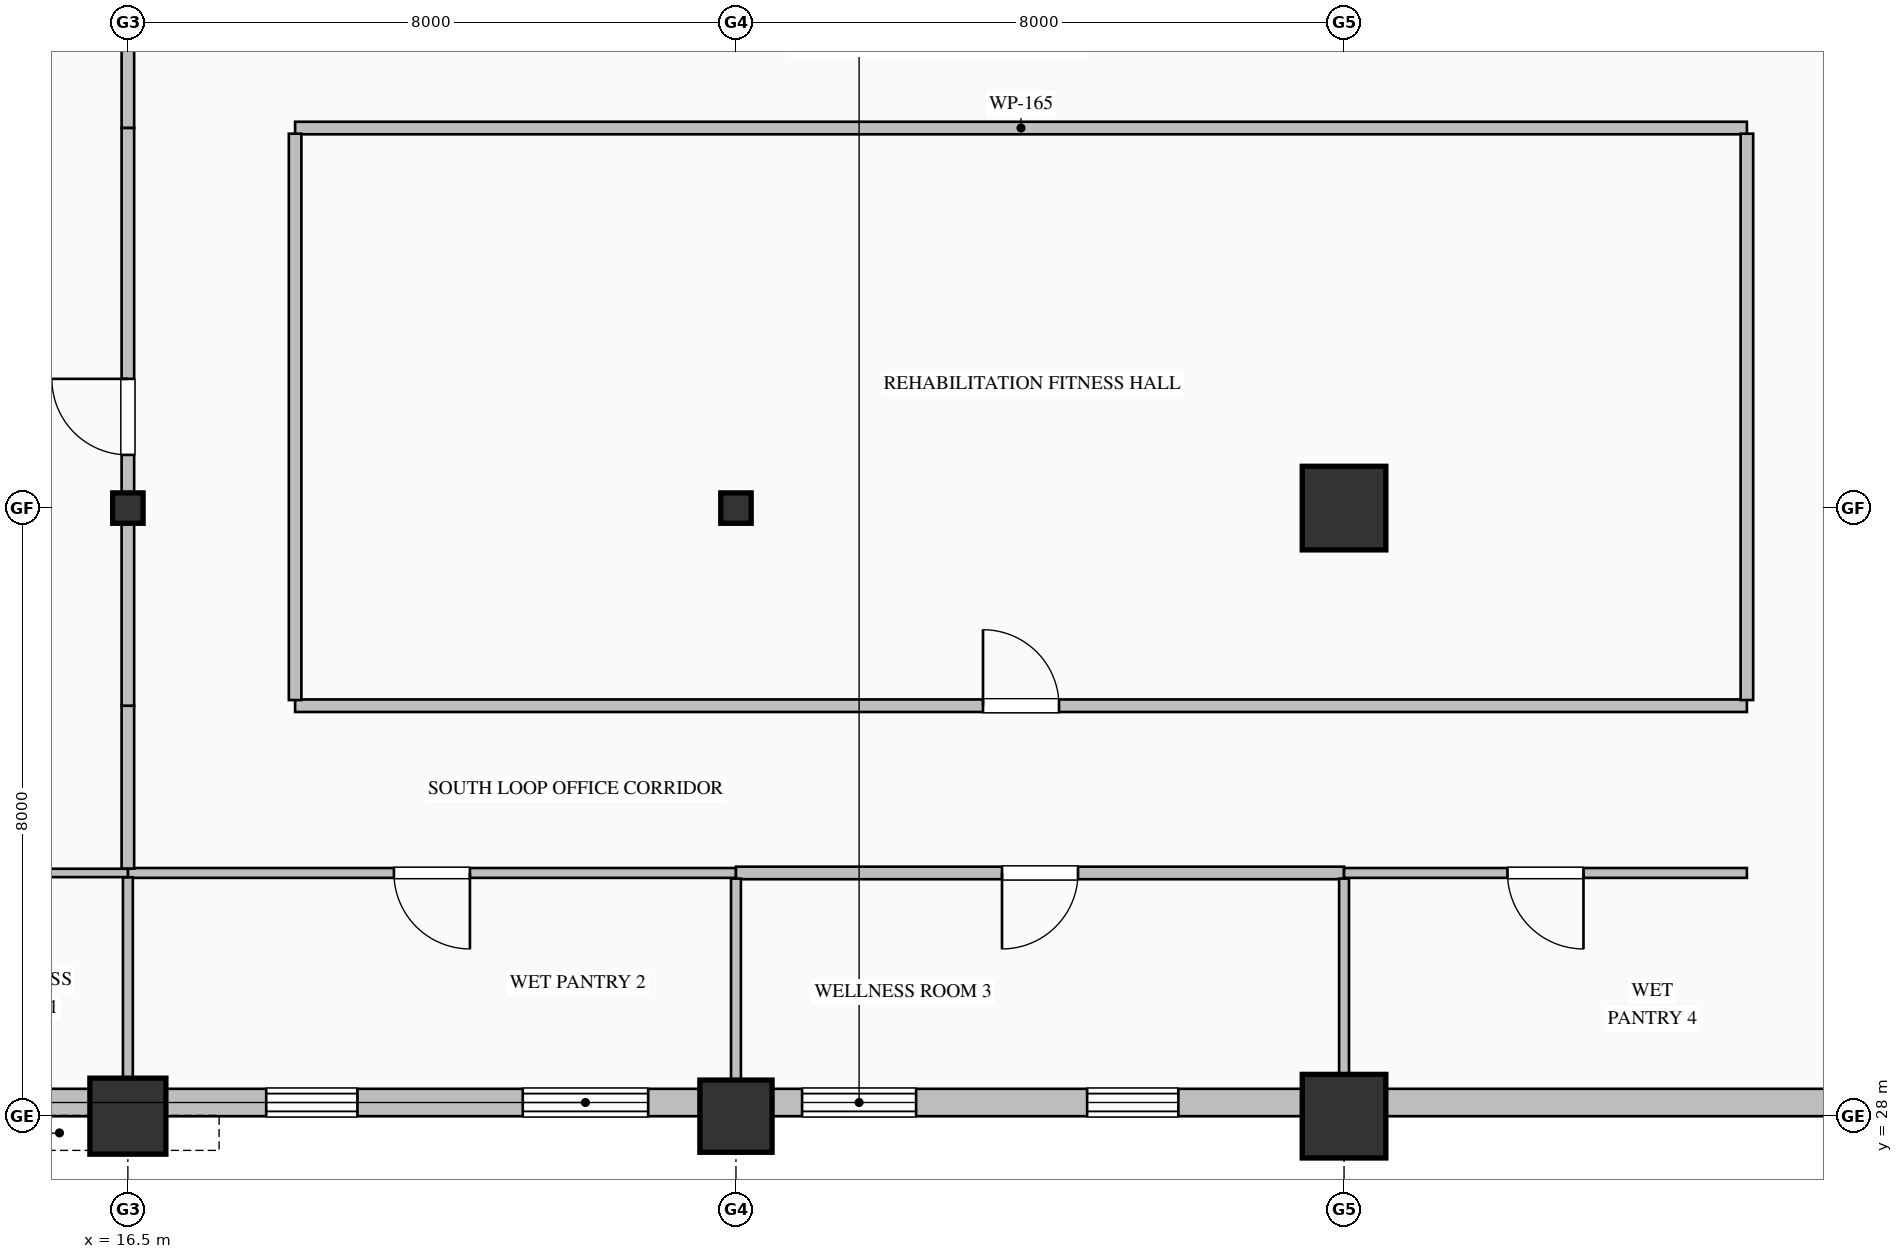
"""IFC4 building model, lengths in metres.
Left out: names, types, materials, properties, quantities, classifications, styles, units other than length and angle.
Written with IfcOpenShell. Run it as: python <this file> out.ifc"""

import sys

from ifc_helpers import new_model, si_unit, direction, frame, frame_2d, origin, origin_2d, place, context, subcontext, project, spatial, rectangle, hollow_rectangle, hollow_circle, i_section, extrude, element, fill, save


model = new_model("IFC4")
c1 = context("Model", 3, precision=1e-05, world=origin(), true_north=direction((0.0, 1.0)))
c2 = subcontext(c1, "Body", "Model", "MODEL_VIEW")
j1 = project(units=[si_unit("LENGTHUNIT", "METRE"), si_unit("PLANEANGLEUNIT", "RADIAN")], contexts=[c1])
p1 = place(None, origin())
s1 = spatial("IfcSite", under=j1, at=p1, CompositionType="ELEMENT")
p2 = place(p1, origin())
s2 = spatial("IfcBuilding", under=s1, at=p2, CompositionType="ELEMENT")
p3 = place(p2, frame((0.0, 0.0, 171.0)))
s3 = spatial("IfcBuildingStorey", under=s2, at=p3, CompositionType="ELEMENT", Elevation=171.0)
p4 = place(p3, frame((16.5, 28.0, 0.0), z_axis=(0.0, 0.0, 1.0), x_axis=(1.0, 0.0, 0.0)))
e1 = element("IfcColumn", 1, at=p4, inside=s3, PredefinedType="COLUMN", context=c2, shape_type="SweptSolid", body=[
    extrude(hollow_circle(Radius=0.5, WallThickness=0.036, at=origin_2d()), origin(), (0.0, 0.0, 1.0), 4.0),
])
p5 = place(p3, frame((16.5, 36.0, 0.0), z_axis=(0.0, 0.0, 1.0), x_axis=(1.0, 0.0, 0.0)))
e2 = element("IfcColumn", 2, at=p5, inside=s3, PredefinedType="COLUMN", context=c2, shape_type="SweptSolid", body=[
    extrude(i_section(OverallWidth=0.4, OverallDepth=0.4, WebThickness=0.013, FlangeThickness=0.021, FilletRadius=0.022, at=origin_2d()), origin(), (0.0, 0.0, 1.0), 4.0),
])
p6 = place(p3, frame((24.5, 28.0, 0.0), z_axis=(0.0, 0.0, 1.0), x_axis=(1.0, 0.0, 0.0)))
e3 = element("IfcColumn", 3, at=p6, inside=s3, PredefinedType="COLUMN", context=c2, shape_type="SweptSolid", body=[
    extrude(hollow_rectangle(XDim=0.95, YDim=0.95, WallThickness=0.036, at=origin_2d()), origin(), (0.0, 0.0, 1.0), 4.0),
])
p7 = place(p3, frame((24.5, 36.0, 0.0), z_axis=(0.0, 0.0, 1.0), x_axis=(1.0, 0.0, 0.0)))
e4 = element("IfcColumn", 4, at=p7, inside=s3, PredefinedType="COLUMN", context=c2, shape_type="SweptSolid", body=[
    extrude(i_section(OverallWidth=0.4, OverallDepth=0.4, WebThickness=0.013, FlangeThickness=0.021, FilletRadius=0.022, at=origin_2d()), origin(), (0.0, 0.0, 1.0), 4.0),
])
for number, where, z_axis, x_axis in (
    (5, (32.5, 28.0, 0.0), (0.0, 0.0, 1.0), (1.0, 0.0, 0.0)),
    (6, (32.5, 36.0, 0.0), (0.0, 0.0, 1.0), (1.0, 0.0, 0.0)),
):
    element("IfcColumn", number, at=place(p3, frame(where, z_axis=z_axis, x_axis=x_axis)), inside=s3, PredefinedType="COLUMN", context=c2, shape_type="SweptSolid", body=[
        extrude(hollow_rectangle(XDim=1.1, YDim=1.1, WallThickness=0.04, at=origin_2d()), origin(), (0.0, 0.0, 1.0), 4.0),
    ])
p8 = place(p3, frame((40.52, 28.18, 0.0), z_axis=(0.0, 0.0, 1.0), x_axis=(-1.0, 0.0, 0.0)))
e7 = element("IfcWall", 7, at=p8, inside=s3, PredefinedType="SOLIDWALL", context=c2, shape_type="SweptSolid", body=[
    extrude(rectangle(XDim=27.52, YDim=0.36, at=frame_2d((13.76, 0.0))), origin(), (0.0, 0.0, 1.0), 3.165),
])
p9 = place(p8, frame((10.2, 0.0, 0.7)))
e8 = element("IfcOpeningElement", 8, at=p9, cuts=e7, PredefinedType="OPENING", context=c2, shape_type="SweptSolid", body=[
    extrude(rectangle(XDim=1.2, YDim=1.85, at=frame_2d((0.6, 0.925))), frame((0.0, 0.19, 0.0), z_axis=(0.0, -1.0, 0.0), x_axis=(1.0, 0.0, 0.0)), (0.0, 0.0, 1.0), 0.38),
])
p10 = place(p8, frame((13.65, 0.0, 0.85)))
e9 = element("IfcOpeningElement", 9, at=p10, cuts=e7, PredefinedType="OPENING", context=c2, shape_type="SweptSolid", body=[
    extrude(rectangle(XDim=1.5, YDim=1.95, at=frame_2d((0.75, 0.975))), frame((0.0, 0.19, 0.0), z_axis=(0.0, -1.0, 0.0), x_axis=(1.0, 0.0, 0.0)), (0.0, 0.0, 1.0), 0.38),
])
p11 = place(p8, frame((17.175, 0.0, 0.85)))
e10 = element("IfcOpeningElement", 10, at=p11, cuts=e7, PredefinedType="OPENING", context=c2, shape_type="SweptSolid", body=[
    extrude(rectangle(XDim=1.65, YDim=1.95, at=frame_2d((0.825, 0.975))), frame((0.0, 0.19, 0.0), z_axis=(0.0, -1.0, 0.0), x_axis=(1.0, 0.0, 0.0)), (0.0, 0.0, 1.0), 0.38),
])
p12 = place(p8, frame((21.0, 0.0, 0.7)))
e11 = element("IfcOpeningElement", 11, at=p12, cuts=e7, PredefinedType="OPENING", context=c2, shape_type="SweptSolid", body=[
    extrude(rectangle(XDim=1.2, YDim=1.85, at=frame_2d((0.6, 0.925))), frame((0.0, 0.19, 0.0), z_axis=(0.0, -1.0, 0.0), x_axis=(1.0, 0.0, 0.0)), (0.0, 0.0, 1.0), 0.38),
])
p13 = place(p3, frame((18.7, 33.4, 0.0), z_axis=(0.0, 0.0, 1.0), x_axis=(1.0, 0.0, 0.0)))
e12 = element("IfcWall", 12, at=p13, inside=s3, PredefinedType="PARTITIONING", context=c2, shape_type="SweptSolid", body=[
    extrude(rectangle(XDim=19.1, YDim=0.165, at=frame_2d((9.55, 0.0))), origin(), (0.0, 0.0, 1.0), 3.765),
])
p14 = place(p13, frame((9.05, 0.0, 0.0)))
e13 = element("IfcOpeningElement", 13, at=p14, cuts=e12, PredefinedType="OPENING", context=c2, shape_type="SweptSolid", body=[
    extrude(rectangle(XDim=1.0, YDim=2.15, at=frame_2d((0.5, 1.075))), frame((0.0, 0.093, 0.0), z_axis=(0.0, -1.0, 0.0), x_axis=(1.0, 0.0, 0.0)), (0.0, 0.0, 1.0), 0.185),
])
p15 = place(p3, frame((24.5, 31.2, 0.0), z_axis=(0.0, 0.0, 1.0), x_axis=(-1.0, 0.0, 0.0)))
e14 = element("IfcWall", 14, at=p15, inside=s3, PredefinedType="PARTITIONING", context=c2, shape_type="SweptSolid", body=[
    extrude(rectangle(XDim=8.0, YDim=0.13, at=frame_2d((4.0, 0.0))), origin(), (0.0, 0.0, 1.0), 3.765),
])
p16 = place(p15, frame((3.5, 0.0, 0.0)))
e15 = element("IfcOpeningElement", 15, at=p16, cuts=e14, PredefinedType="OPENING", context=c2, shape_type="SweptSolid", body=[
    extrude(rectangle(XDim=1.0, YDim=2.15, at=frame_2d((0.5, 1.075))), frame((0.0, 0.075, 0.0), z_axis=(0.0, -1.0, 0.0), x_axis=(1.0, 0.0, 0.0)), (0.0, 0.0, 1.0), 0.15),
])
p17 = place(p3, frame((32.5, 31.2, 0.0), z_axis=(0.0, 0.0, 1.0), x_axis=(-1.0, 0.0, 0.0)))
e16 = element("IfcWall", 16, at=p17, inside=s3, PredefinedType="PARTITIONING", context=c2, shape_type="SweptSolid", body=[
    extrude(rectangle(XDim=8.0, YDim=0.165, at=frame_2d((4.0, 0.0))), origin(), (0.0, 0.0, 1.0), 3.765),
])
p18 = place(p17, frame((3.5, 0.0, 0.0)))
e17 = element("IfcOpeningElement", 17, at=p18, cuts=e16, PredefinedType="OPENING", context=c2, shape_type="SweptSolid", body=[
    extrude(rectangle(XDim=1.0, YDim=2.15, at=frame_2d((0.5, 1.075))), frame((0.0, 0.093, 0.0), z_axis=(0.0, -1.0, 0.0), x_axis=(1.0, 0.0, 0.0)), (0.0, 0.0, 1.0), 0.185),
])
p19 = place(p3, frame((37.8, 31.2, 0.0), z_axis=(0.0, 0.0, 1.0), x_axis=(-1.0, 0.0, 0.0)))
e18 = element("IfcWall", 18, at=p19, inside=s3, PredefinedType="PARTITIONING", context=c2, shape_type="SweptSolid", body=[
    extrude(rectangle(XDim=5.3, YDim=0.13, at=frame_2d((2.65, 0.0))), origin(), (0.0, 0.0, 1.0), 3.765),
])
p20 = place(p19, frame((2.15, 0.0, 0.0)))
e19 = element("IfcOpeningElement", 19, at=p20, cuts=e18, PredefinedType="OPENING", context=c2, shape_type="SweptSolid", body=[
    extrude(rectangle(XDim=1.0, YDim=2.15, at=frame_2d((0.5, 1.075))), frame((0.0, 0.075, 0.0), z_axis=(0.0, -1.0, 0.0), x_axis=(1.0, 0.0, 0.0)), (0.0, 0.0, 1.0), 0.15),
])
p21 = place(p3, frame((16.5, 31.257, 0.0), z_axis=(0.0, 0.0, 1.0), x_axis=(0.0, 1.0, 0.0)))
e20 = element("IfcWall", 20, at=p21, inside=s3, PredefinedType="PARTITIONING", context=c2, shape_type="SweptSolid", body=[
    extrude(rectangle(XDim=2.143, YDim=0.165, at=frame_2d((1.071, 0.0))), origin(), (0.0, 0.0, 1.0), 3.157),
])
p22 = place(p3, frame((37.8, 41.0, 0.0), z_axis=(0.0, 0.0, 1.0), x_axis=(-1.0, 0.0, 0.0)))
e21 = element("IfcWall", 21, at=p22, inside=s3, PredefinedType="PARTITIONING", context=c2, shape_type="SweptSolid", body=[
    extrude(rectangle(XDim=19.1, YDim=0.165, at=frame_2d((9.55, 0.0))), origin(), (0.0, 0.0, 1.0), 3.765),
])
p23 = place(p3, frame((16.5, 41.0, 0.0), z_axis=(0.0, 0.0, 1.0), x_axis=(0.0, 1.0, 0.0)))
e22 = element("IfcWall", 22, at=p23, inside=s3, PredefinedType="PARTITIONING", context=c2, shape_type="SweptSolid", body=[
    extrude(rectangle(XDim=2.125, YDim=0.165, at=frame_2d((1.063, 0.0))), origin(), (0.0, 0.0, 1.0), 3.157),
])
p24 = place(p3, frame((18.7, 40.926, 0.0), z_axis=(0.0, 0.0, 1.0), x_axis=(0.0, -1.0, 0.0)))
e23 = element("IfcWall", 23, at=p24, inside=s3, PredefinedType="PARTITIONING", context=c2, shape_type="SweptSolid", body=[
    extrude(rectangle(XDim=7.451, YDim=0.165, at=frame_2d((3.726, 0.0))), origin(), (0.0, 0.0, 1.0), 3.765),
])
p25 = place(p3, frame((16.5, 33.4, 0.0), z_axis=(0.0, 0.0, 1.0), x_axis=(0.0, 1.0, 0.0)))
e24 = element("IfcWall", 24, at=p25, inside=s3, PredefinedType="PARTITIONING", context=c2, shape_type="SweptSolid", body=[
    extrude(rectangle(XDim=7.6, YDim=0.165, at=frame_2d((3.8, 0.0))), origin(), (0.0, 0.0, 1.0), 3.157),
])
p26 = place(p25, frame((3.3, 0.0, 0.0)))
e25 = element("IfcOpeningElement", 25, at=p26, cuts=e24, PredefinedType="OPENING", context=c2, shape_type="SweptSolid", body=[
    extrude(rectangle(XDim=1.0, YDim=2.15, at=frame_2d((0.5, 1.075))), frame((0.0, 0.093, 0.0), z_axis=(0.0, -1.0, 0.0), x_axis=(1.0, 0.0, 0.0)), (0.0, 0.0, 1.0), 0.185),
])
p27 = place(p3, frame((37.8, 33.475, 0.0), z_axis=(0.0, 0.0, 1.0), x_axis=(0.0, 1.0, 0.0)))
e26 = element("IfcWall", 26, at=p27, inside=s3, PredefinedType="PARTITIONING", context=c2, shape_type="SweptSolid", body=[
    extrude(rectangle(XDim=7.451, YDim=0.165, at=frame_2d((3.726, 0.0))), origin(), (0.0, 0.0, 1.0), 3.765),
])
p28 = place(p3, frame((16.5, 31.143, 0.0), z_axis=(0.0, 0.0, 1.0), x_axis=(0.0, -1.0, 0.0)))
e27 = element("IfcWall", 27, at=p28, inside=s3, PredefinedType="PARTITIONING", context=c2, shape_type="SweptSolid", body=[
    extrude(rectangle(XDim=2.791, YDim=0.13, at=frame_2d((1.396, 0.0))), origin(), (0.0, 0.0, 1.0), 3.157),
])
p29 = place(p3, frame((10.298, 31.2, 0.0), z_axis=(0.0, 0.0, 1.0), x_axis=(1.0, 0.0, 0.0)))
e28 = element("IfcWall", 28, at=p29, inside=s3, PredefinedType="MOVABLE", context=c2, shape_type="SweptSolid", body=[
    extrude(rectangle(XDim=6.202, YDim=0.11, at=frame_2d((3.101, 0.0))), origin(), (0.0, 0.0, 1.0), 3.765),
])
p30 = place(p29, frame((2.601, 0.0, 0.0)))
e29 = element("IfcOpeningElement", 29, at=p30, cuts=e28, PredefinedType="OPENING", context=c2, shape_type="SweptSolid", body=[
    extrude(rectangle(XDim=1.0, YDim=2.15, at=frame_2d((0.5, 1.075))), frame((0.0, 0.065, 0.0), z_axis=(0.0, -1.0, 0.0), x_axis=(1.0, 0.0, 0.0)), (0.0, 0.0, 1.0), 0.13),
])
for number, where, z_axis, x_axis in (
    (30, (24.5, 31.125, 0.0), (0.0, 0.0, 1.0), (0.0, -1.0, 0.0)),
    (31, (32.5, 31.125, 0.0), (0.0, 0.0, 1.0), (0.0, -1.0, 0.0)),
):
    element("IfcWall", number, at=place(p3, frame(where, z_axis=z_axis, x_axis=x_axis)), inside=s3, PredefinedType="PARTITIONING", context=c2, shape_type="SweptSolid", body=[
        extrude(rectangle(XDim=2.773, YDim=0.13, at=frame_2d((1.387, 0.0))), origin(), (0.0, 0.0, 1.0), 3.157),
    ])
p31 = place(p9, origin())
e32 = element("IfcWindow", 32, at=p31, inside=s3, PartitioningType="DOUBLE_PANEL_VERTICAL", PredefinedType="WINDOW", context=c2, shape_type="SweptSolid", body=[
    extrude(rectangle(XDim=1.2, YDim=1.85, at=frame_2d((0.6, 0.925))), frame((0.0, 0.15, 0.0), z_axis=(0.0, -1.0, 0.0), x_axis=(1.0, 0.0, 0.0)), (0.0, 0.0, 1.0), 0.06),
])
fill(e8, e32)
p32 = place(p10, origin())
e33 = element("IfcWindow", 33, at=p32, inside=s3, PartitioningType="DOUBLE_PANEL_VERTICAL", PredefinedType="WINDOW", context=c2, shape_type="SweptSolid", body=[
    extrude(rectangle(XDim=1.5, YDim=1.95, at=frame_2d((0.75, 0.975))), frame((0.0, 0.15, 0.0), z_axis=(0.0, -1.0, 0.0), x_axis=(1.0, 0.0, 0.0)), (0.0, 0.0, 1.0), 0.06),
])
fill(e9, e33)
p33 = place(p11, origin())
e34 = element("IfcWindow", 34, at=p33, inside=s3, PartitioningType="DOUBLE_PANEL_VERTICAL", PredefinedType="WINDOW", context=c2, shape_type="SweptSolid", body=[
    extrude(rectangle(XDim=1.65, YDim=1.95, at=frame_2d((0.825, 0.975))), frame((0.0, 0.15, 0.0), z_axis=(0.0, -1.0, 0.0), x_axis=(1.0, 0.0, 0.0)), (0.0, 0.0, 1.0), 0.06),
])
fill(e10, e34)
p34 = place(p12, origin())
e35 = element("IfcWindow", 35, at=p34, inside=s3, PartitioningType="DOUBLE_PANEL_VERTICAL", PredefinedType="WINDOW", context=c2, shape_type="SweptSolid", body=[
    extrude(rectangle(XDim=1.2, YDim=1.85, at=frame_2d((0.6, 0.925))), frame((0.0, 0.15, 0.0), z_axis=(0.0, -1.0, 0.0), x_axis=(1.0, 0.0, 0.0)), (0.0, 0.0, 1.0), 0.06),
])
fill(e11, e35)
p35 = place(p14, origin())
e36 = element("IfcDoor", 36, at=p35, inside=s3, OperationType="SINGLE_SWING_LEFT", PredefinedType="DOOR", context=c2, shape_type="SweptSolid", body=[
    extrude(rectangle(XDim=1.0, YDim=2.15, at=frame_2d((0.5, 1.075))), frame((0.0, 0.025, 0.0), z_axis=(0.0, -1.0, 0.0), x_axis=(1.0, 0.0, 0.0)), (0.0, 0.0, 1.0), 0.05),
])
fill(e13, e36)
p36 = place(p16, origin())
e37 = element("IfcDoor", 37, at=p36, inside=s3, OperationType="SINGLE_SWING_LEFT", PredefinedType="DOOR", context=c2, shape_type="SweptSolid", body=[
    extrude(rectangle(XDim=1.0, YDim=2.15, at=frame_2d((0.5, 1.075))), frame((0.0, 0.025, 0.0), z_axis=(0.0, -1.0, 0.0), x_axis=(1.0, 0.0, 0.0)), (0.0, 0.0, 1.0), 0.05),
])
fill(e15, e37)
p37 = place(p18, origin())
e38 = element("IfcDoor", 38, at=p37, inside=s3, OperationType="SINGLE_SWING_RIGHT", PredefinedType="DOOR", context=c2, shape_type="SweptSolid", body=[
    extrude(rectangle(XDim=1.0, YDim=2.15, at=frame_2d((0.5, 1.075))), frame((0.0, 0.025, 0.0), z_axis=(0.0, -1.0, 0.0), x_axis=(1.0, 0.0, 0.0)), (0.0, 0.0, 1.0), 0.05),
])
fill(e17, e38)
p38 = place(p20, origin())
e39 = element("IfcDoor", 39, at=p38, inside=s3, OperationType="SINGLE_SWING_LEFT", PredefinedType="DOOR", context=c2, shape_type="SweptSolid", body=[
    extrude(rectangle(XDim=1.0, YDim=2.15, at=frame_2d((0.5, 1.075))), frame((0.0, 0.025, 0.0), z_axis=(0.0, -1.0, 0.0), x_axis=(1.0, 0.0, 0.0)), (0.0, 0.0, 1.0), 0.05),
])
fill(e19, e39)
p39 = place(p26, origin())
e40 = element("IfcDoor", 40, at=p39, inside=s3, OperationType="SINGLE_SWING_RIGHT", PredefinedType="DOOR", context=c2, shape_type="SweptSolid", body=[
    extrude(rectangle(XDim=1.0, YDim=2.15, at=frame_2d((0.5, 1.075))), frame((0.0, 0.025, 0.0), z_axis=(0.0, -1.0, 0.0), x_axis=(1.0, 0.0, 0.0)), (0.0, 0.0, 1.0), 0.05),
])
fill(e25, e40)
save(model, sys.argv[1])
